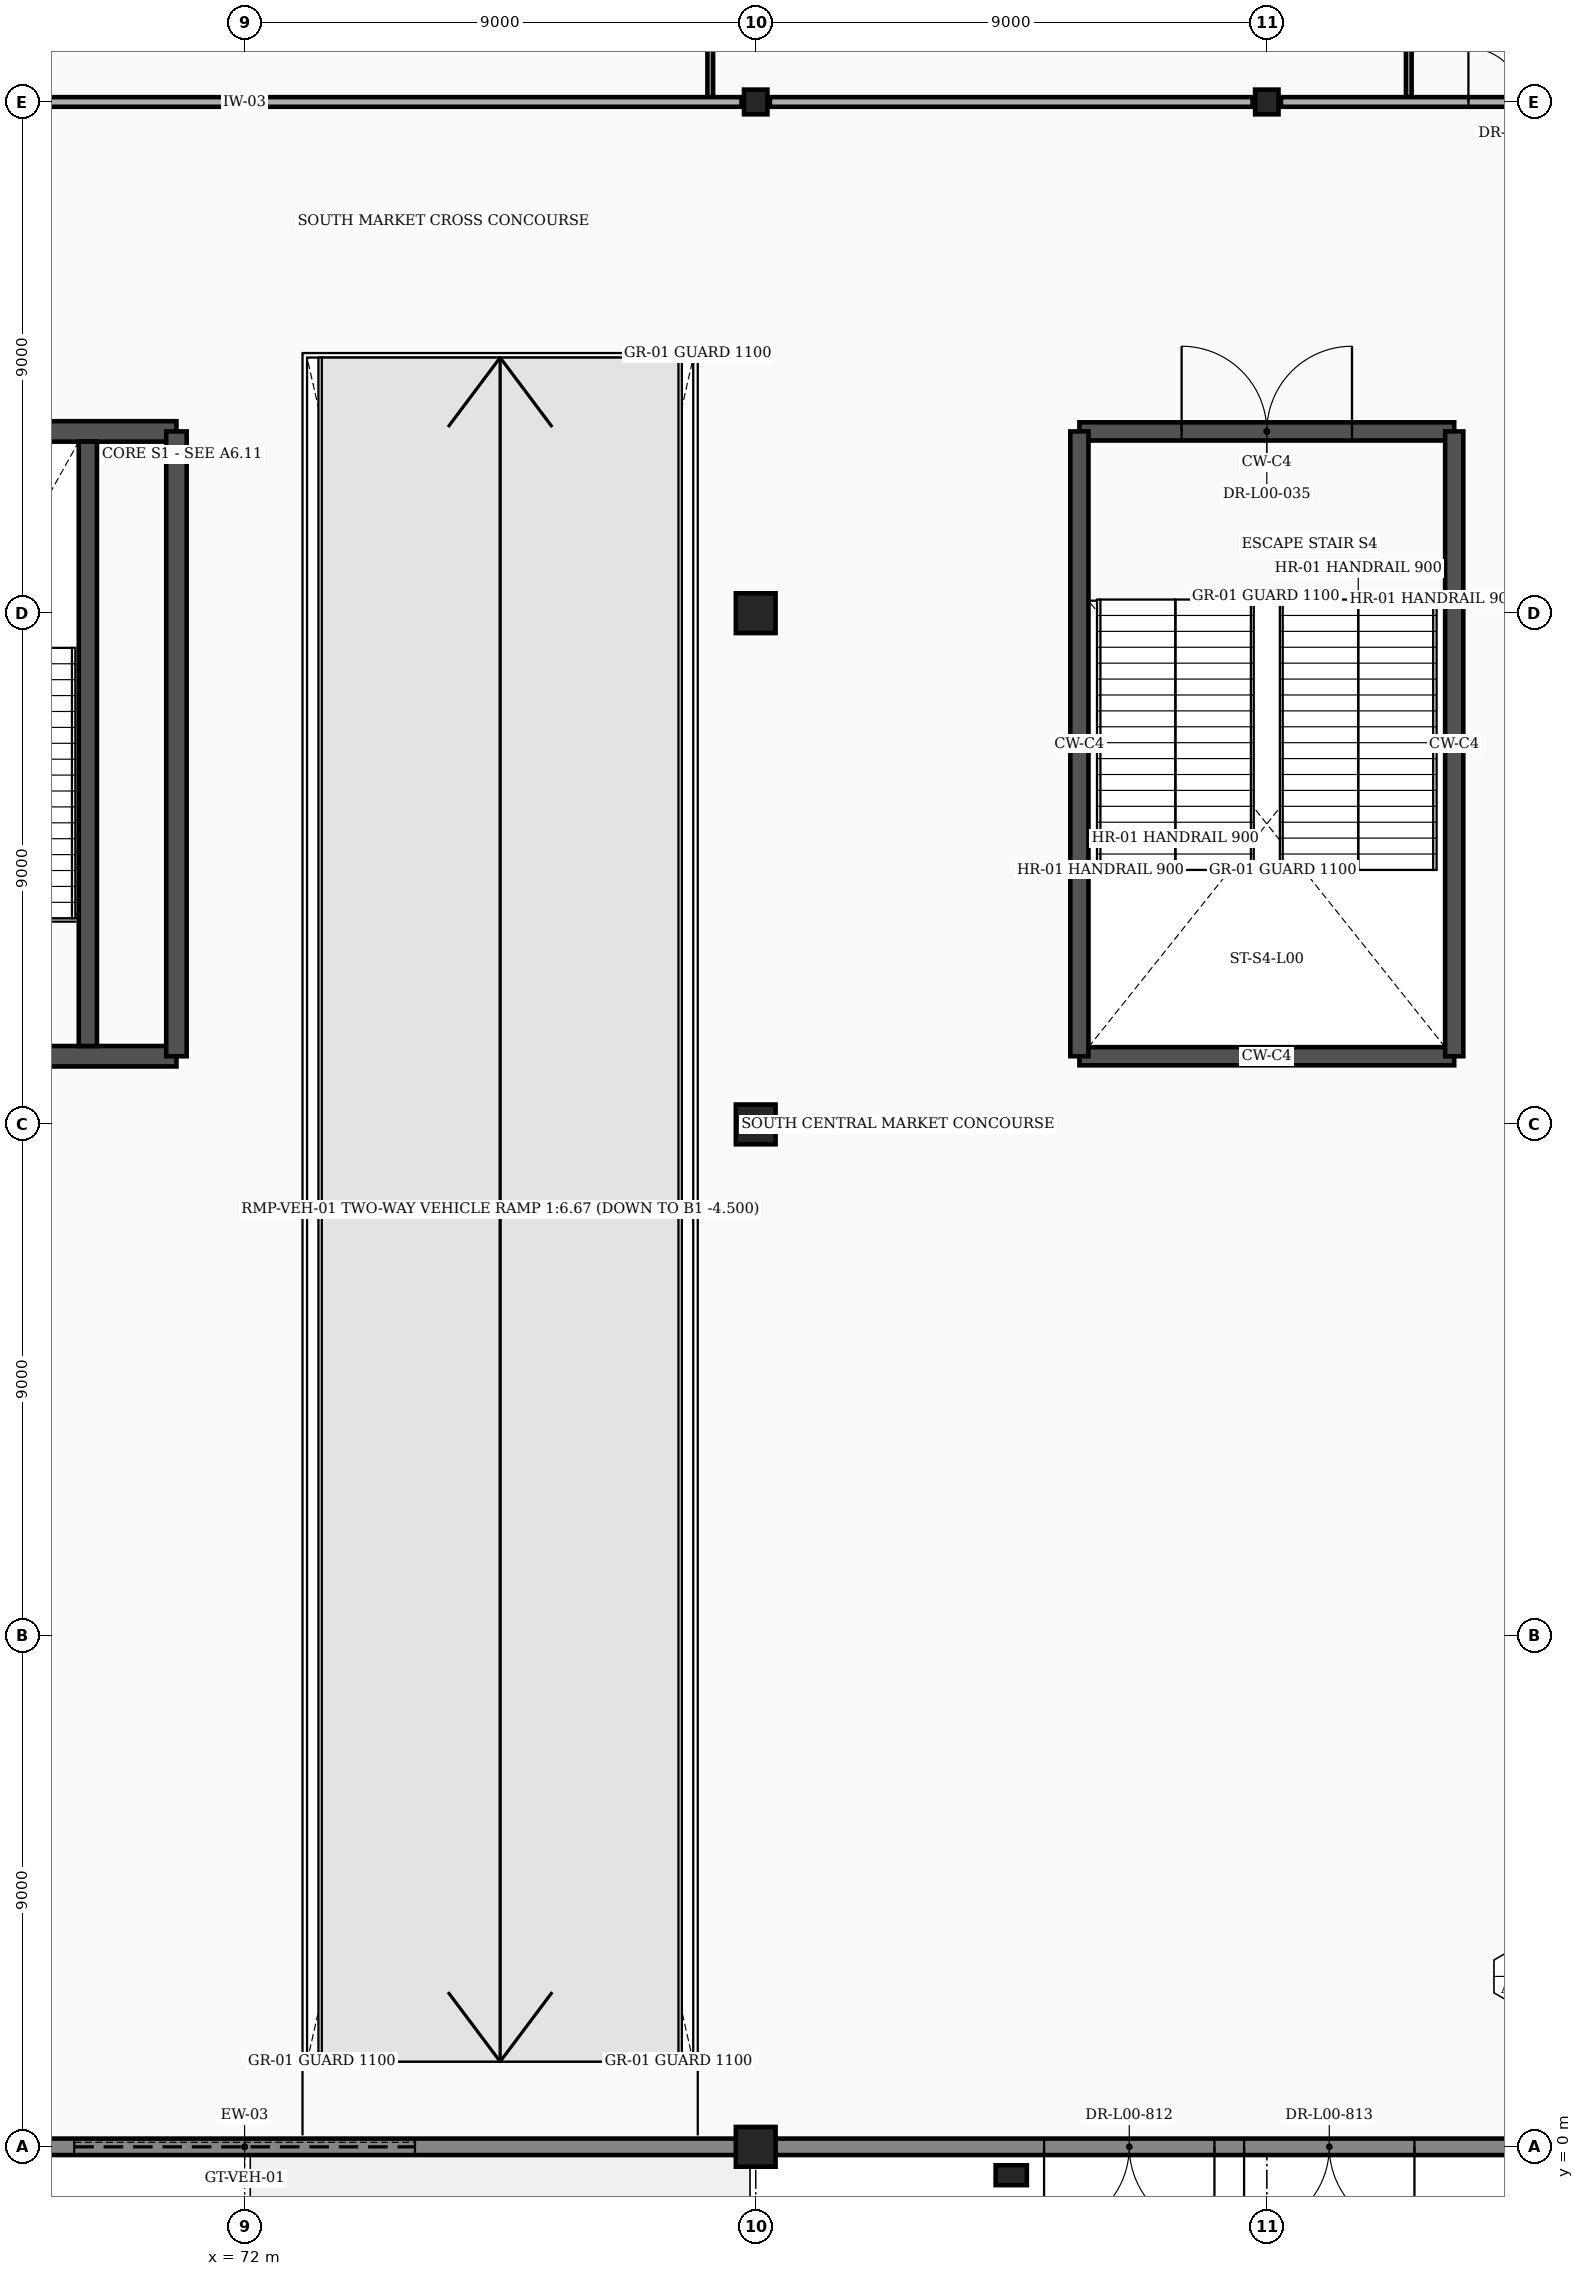
"""IFC4 building model, lengths in metres.
Left out: names, types, materials, properties, quantities, classifications, styles, units other than length and angle.
Written with IfcOpenShell. Run it as: python <this file> out.ifc"""

import sys

from ifc_helpers import new_model, si_unit, direction, frame, frame_2d, origin, origin_2d, place, context, subcontext, project, spatial, rectangle, i_section, extrude, element, fill, save


model = new_model("IFC4")
c1 = context("Model", 3, precision=1e-05, world=origin(), true_north=direction((0.0, 1.0)))
c2 = subcontext(c1, "Body", "Model", "MODEL_VIEW")
j1 = project(units=[si_unit("LENGTHUNIT", "METRE"), si_unit("PLANEANGLEUNIT", "RADIAN")], contexts=[c1])
p1 = place(None, origin())
s1 = spatial("IfcSite", under=j1, at=p1, CompositionType="ELEMENT")
p2 = place(p1, origin())
s2 = spatial("IfcBuilding", under=s1, at=p2, CompositionType="ELEMENT")
p3 = place(p2, origin())
s3 = spatial("IfcBuildingStorey", under=s2, at=p3, CompositionType="ELEMENT", Elevation=0.0)
for number, where, z_axis, x_axis in (
    (1, (81.0, 0.0, 0.0), (0.0, 0.0, 1.0), (1.0, 0.0, 0.0)),
    (2, (81.0, 18.0, 0.0), (0.0, 0.0, 1.0), (1.0, 0.0, 0.0)),
    (3, (81.0, 27.0, 0.0), (0.0, 0.0, 1.0), (1.0, 0.0, 0.0)),
):
    element("IfcColumn", number, at=place(p3, frame(where, z_axis=z_axis, x_axis=x_axis)), inside=s3, PredefinedType="COLUMN", context=c2, shape_type="SweptSolid", body=[
        extrude(rectangle(XDim=0.7, YDim=0.7, at=origin_2d()), origin(), (0.0, 0.0, 1.0), 6.0),
    ])
for number, where, z_axis, x_axis in (
    (4, (81.0, 36.0, 0.0), (0.0, 0.0, 1.0), (1.0, 0.0, 0.0)),
    (5, (90.0, 36.0, 0.0), (0.0, 0.0, 1.0), (1.0, 0.0, 0.0)),
):
    element("IfcColumn", number, at=place(p3, frame(where, z_axis=z_axis, x_axis=x_axis)), inside=s3, PredefinedType="COLUMN", context=c2, shape_type="SweptSolid", body=[
        extrude(i_section(OverallWidth=0.412, OverallDepth=0.435, WebThickness=0.036, FlangeThickness=0.058, at=origin_2d()), origin(), (0.0, 0.0, 1.0), 6.0),
    ])
p4 = place(p3, frame((85.5, -0.5, 0.0), z_axis=(0.0, 0.0, 1.0), x_axis=(1.0, 0.0, 0.0)))
e6 = element("IfcColumn", 6, at=p4, inside=s3, PredefinedType="PILASTER", context=c2, shape_type="SweptSolid", body=[
    extrude(rectangle(XDim=0.55, YDim=0.35, at=origin_2d()), origin(), (0.0, 0.0, 1.0), 6.0),
])
p5 = place(p3, frame((63.342, 0.0, 0.0), z_axis=(0.0, 0.0, 1.0), x_axis=(1.0, 0.0, 0.0)))
e7 = element("IfcWall", 7, at=p5, inside=s3, PredefinedType="STANDARD", context=c2, shape_type="SweptSolid", body=[
    extrude(rectangle(XDim=17.316, YDim=0.29, at=frame_2d((8.658, 0.0))), origin(), (0.0, 0.0, 1.0), 4.988),
])
p6 = place(p5, frame((5.658, 0.0, 0.0)))
e8 = element("IfcOpeningElement", 8, at=p6, cuts=e7, PredefinedType="OPENING", context=c2, shape_type="SweptSolid", body=[
    extrude(rectangle(XDim=6.0, YDim=3.6, at=frame_2d((3.0, 1.8))), frame((0.0, 0.157, 0.0), z_axis=(0.0, -1.0, 0.0), x_axis=(1.0, 0.0, 0.0)), (0.0, 0.0, 1.0), 0.314),
])
p7 = place(p3, frame((81.342, 0.0, 0.0), z_axis=(0.0, 0.0, 1.0), x_axis=(1.0, 0.0, 0.0)))
e9 = element("IfcWall", 9, at=p7, inside=s3, PredefinedType="STANDARD", context=c2, shape_type="SweptSolid", body=[
    extrude(rectangle(XDim=17.316, YDim=0.29, at=frame_2d((8.658, 0.0))), origin(), (0.0, 0.0, 1.0), 4.988),
])
p8 = place(p7, frame((4.736, 0.0, 0.0)))
e10 = element("IfcOpeningElement", 10, at=p8, cuts=e9, PredefinedType="OPENING", context=c2, shape_type="SweptSolid", body=[
    extrude(rectangle(XDim=3.0, YDim=2.4, at=frame_2d((1.5, 1.2))), frame((0.0, 0.157, 0.0), z_axis=(0.0, -1.0, 0.0), x_axis=(1.0, 0.0, 0.0)), (0.0, 0.0, 1.0), 0.314),
])
p9 = place(p7, frame((8.258, 0.0, 0.0)))
e11 = element("IfcOpeningElement", 11, at=p9, cuts=e9, PredefinedType="OPENING", context=c2, shape_type="SweptSolid", body=[
    extrude(rectangle(XDim=3.0, YDim=2.4, at=frame_2d((1.5, 1.2))), frame((0.0, 0.157, 0.0), z_axis=(0.0, -1.0, 0.0), x_axis=(1.0, 0.0, 0.0)), (0.0, 0.0, 1.0), 0.314),
])
p10 = place(p7, frame((12.93, 0.0, 0.0)))
e12 = element("IfcOpeningElement", 12, at=p10, cuts=e9, PredefinedType="OPENING", context=c2, shape_type="SweptSolid", body=[
    extrude(rectangle(XDim=3.0, YDim=2.4, at=frame_2d((1.5, 1.2))), frame((0.0, 0.157, 0.0), z_axis=(0.0, -1.0, 0.0), x_axis=(1.0, 0.0, 0.0)), (0.0, 0.0, 1.0), 0.314),
])
for number, where, z_axis, x_axis in (
    (13, (64.2, 19.2, 0.0), (0.0, 0.0, 1.0), (1.0, 0.0, 0.0)),
    (14, (64.2, 30.2, 0.0), (0.0, 0.0, 1.0), (1.0, 0.0, 0.0)),
):
    element("IfcWall", number, at=place(p3, frame(where, z_axis=z_axis, x_axis=x_axis)), inside=s3, PredefinedType="SHEAR", context=c2, shape_type="SweptSolid", body=[
        extrude(rectangle(XDim=6.6, YDim=0.36, at=frame_2d((3.3, 0.0))), origin(), (0.0, 0.0, 1.0), 5.75),
    ])
p11 = place(p3, frame((70.8, 19.2, 0.0), z_axis=(0.0, 0.0, 1.0), x_axis=(0.0, 1.0, 0.0)))
e15 = element("IfcWall", 15, at=p11, inside=s3, PredefinedType="SHEAR", context=c2, shape_type="SweptSolid", body=[
    extrude(rectangle(XDim=11.0, YDim=0.36, at=frame_2d((5.5, 0.0))), origin(), (0.0, 0.0, 1.0), 5.75),
])
p12 = place(p3, frame((69.24, 19.38, 0.0), z_axis=(0.0, 0.0, 1.0), x_axis=(0.0, 1.0, 0.0)))
e16 = element("IfcWall", 16, at=p12, inside=s3, PredefinedType="SHEAR", context=c2, shape_type="SweptSolid", body=[
    extrude(rectangle(XDim=10.64, YDim=0.32, at=frame_2d((5.32, 0.0))), origin(), (0.0, 0.0, 1.0), 5.75),
])
p13 = place(p3, frame((86.7, 19.2, 0.0), z_axis=(0.0, 0.0, 1.0), x_axis=(1.0, 0.0, 0.0)))
e17 = element("IfcWall", 17, at=p13, inside=s3, PredefinedType="SHEAR", context=c2, shape_type="SweptSolid", body=[
    extrude(rectangle(XDim=6.6, YDim=0.32, at=frame_2d((3.3, 0.0))), origin(), (0.0, 0.0, 1.0), 5.75),
])
p14 = place(p3, frame((86.7, 30.2, 0.0), z_axis=(0.0, 0.0, 1.0), x_axis=(1.0, 0.0, 0.0)))
e18 = element("IfcWall", 18, at=p14, inside=s3, PredefinedType="SHEAR", context=c2, shape_type="SweptSolid", body=[
    extrude(rectangle(XDim=6.6, YDim=0.32, at=frame_2d((3.3, 0.0))), origin(), (0.0, 0.0, 1.0), 5.75),
])
p15 = place(p14, frame((1.8, 0.0, 0.0)))
e19 = element("IfcOpeningElement", 19, at=p15, cuts=e18, PredefinedType="OPENING", context=c2, shape_type="SweptSolid", body=[
    extrude(rectangle(XDim=3.0, YDim=2.25, at=frame_2d((1.5, 1.125))), frame((0.0, 0.172, 0.0), z_axis=(0.0, -1.0, 0.0), x_axis=(1.0, 0.0, 0.0)), (0.0, 0.0, 1.0), 0.344),
])
for number, where, z_axis, x_axis in (
    (20, (86.7, 19.2, 0.0), (0.0, 0.0, 1.0), (0.0, 1.0, 0.0)),
    (21, (93.3, 19.2, 0.0), (0.0, 0.0, 1.0), (0.0, 1.0, 0.0)),
):
    element("IfcWall", number, at=place(p3, frame(where, z_axis=z_axis, x_axis=x_axis)), inside=s3, PredefinedType="SHEAR", context=c2, shape_type="SweptSolid", body=[
        extrude(rectangle(XDim=11.0, YDim=0.32, at=frame_2d((5.5, 0.0))), origin(), (0.0, 0.0, 1.0), 5.75),
    ])
p16 = place(p3, frame((80.2, 36.085, 0.0), z_axis=(0.0, 0.0, 1.0), x_axis=(0.0, 1.0, 0.0)))
e22 = element("IfcWall", 22, at=p16, inside=s3, PredefinedType="PARTITIONING", context=c2, shape_type="SweptSolid", body=[
    extrude(rectangle(XDim=9.865, YDim=0.1, at=frame_2d((4.933, 0.0))), origin(), (0.0, 0.0, 1.0), 4.2),
])
p17 = place(p3, frame((92.5, 36.085, 0.0), z_axis=(0.0, 0.0, 1.0), x_axis=(0.0, 1.0, 0.0)))
e23 = element("IfcWall", 23, at=p17, inside=s3, PredefinedType="PARTITIONING", context=c2, shape_type="SweptSolid", body=[
    extrude(rectangle(XDim=9.915, YDim=0.1, at=frame_2d((4.958, 0.0))), origin(), (0.0, 0.0, 1.0), 4.2),
])
p18 = place(p3, frame((63.25, 36.0, 0.0), z_axis=(0.0, 0.0, 1.0), x_axis=(1.0, 0.0, 0.0)))
e24 = element("IfcWall", 24, at=p18, inside=s3, PredefinedType="PARTITIONING", context=c2, shape_type="SweptSolid", body=[
    extrude(rectangle(XDim=17.5, YDim=0.17, at=frame_2d((8.75, 0.0))), origin(), (0.0, 0.0, 1.0), 4.988),
])
p19 = place(p3, frame((81.25, 36.0, 0.0), z_axis=(0.0, 0.0, 1.0), x_axis=(1.0, 0.0, 0.0)))
e25 = element("IfcWall", 25, at=p19, inside=s3, PredefinedType="PARTITIONING", context=c2, shape_type="SweptSolid", body=[
    extrude(rectangle(XDim=8.5, YDim=0.17, at=frame_2d((4.25, 0.0))), origin(), (0.0, 0.0, 1.0), 5.138),
])
p20 = place(p3, frame((90.25, 36.0, 0.0), z_axis=(0.0, 0.0, 1.0), x_axis=(1.0, 0.0, 0.0)))
e26 = element("IfcWall", 26, at=p20, inside=s3, PredefinedType="PARTITIONING", context=c2, shape_type="SweptSolid", body=[
    extrude(rectangle(XDim=8.5, YDim=0.17, at=frame_2d((4.25, 0.0))), origin(), (0.0, 0.0, 1.0), 5.138),
])
p21 = place(p20, frame((3.3, 0.0, 0.0)))
e27 = element("IfcOpeningElement", 27, at=p21, cuts=e26, PredefinedType="OPENING", context=c2, shape_type="SweptSolid", body=[
    extrude(rectangle(XDim=1.9, YDim=2.35, at=frame_2d((0.95, 1.175))), frame((0.0, 0.097, 0.0), z_axis=(0.0, -1.0, 0.0), x_axis=(1.0, 0.0, 0.0)), (0.0, 0.0, 1.0), 0.194),
])
p22 = place(p6, frame((6.0, 0.0, 0.0), z_axis=(0.0, 0.0, 1.0), x_axis=(-1.0, 0.0, 0.0)))
e28 = element("IfcDoor", 28, at=p22, inside=s3, OperationType="ROLLINGUP", PredefinedType="GATE", context=c2, shape_type="SweptSolid", body=[
    extrude(rectangle(XDim=6.0, YDim=3.6, at=frame_2d((3.0, 1.8))), frame((0.0, 0.025, 0.0), z_axis=(0.0, -1.0, 0.0), x_axis=(1.0, 0.0, 0.0)), (0.0, 0.0, 1.0), 0.05),
])
fill(e8, e28)
p23 = place(p8, frame((3.0, 0.0, 0.0), z_axis=(0.0, 0.0, 1.0), x_axis=(-1.0, 0.0, 0.0)))
e29 = element("IfcDoor", 29, at=p23, inside=s3, OperationType="DOUBLE_DOOR_SINGLE_SWING", PredefinedType="DOOR", context=c2, shape_type="SweptSolid", body=[
    extrude(rectangle(XDim=3.0, YDim=2.4, at=frame_2d((1.5, 1.2))), frame((0.0, 0.025, 0.0), z_axis=(0.0, -1.0, 0.0), x_axis=(1.0, 0.0, 0.0)), (0.0, 0.0, 1.0), 0.05),
])
fill(e10, e29)
p24 = place(p9, frame((3.0, 0.0, 0.0), z_axis=(0.0, 0.0, 1.0), x_axis=(-1.0, 0.0, 0.0)))
e30 = element("IfcDoor", 30, at=p24, inside=s3, OperationType="DOUBLE_DOOR_SINGLE_SWING", PredefinedType="DOOR", context=c2, shape_type="SweptSolid", body=[
    extrude(rectangle(XDim=3.0, YDim=2.4, at=frame_2d((1.5, 1.2))), frame((0.0, 0.025, 0.0), z_axis=(0.0, -1.0, 0.0), x_axis=(1.0, 0.0, 0.0)), (0.0, 0.0, 1.0), 0.05),
])
fill(e11, e30)
p25 = place(p15, origin())
e31 = element("IfcDoor", 31, at=p25, inside=s3, OperationType="DOUBLE_DOOR_SINGLE_SWING", PredefinedType="DOOR", context=c2, shape_type="SweptSolid", body=[
    extrude(rectangle(XDim=3.0, YDim=2.25, at=frame_2d((1.5, 1.125))), frame((0.0, 0.025, 0.0), z_axis=(0.0, -1.0, 0.0), x_axis=(1.0, 0.0, 0.0)), (0.0, 0.0, 1.0), 0.05),
])
fill(e19, e31)
p26 = place(p21, origin())
e32 = element("IfcDoor", 32, at=p26, inside=s3, OperationType="DOUBLE_DOOR_SINGLE_SWING", PredefinedType="DOOR", context=c2, shape_type="SweptSolid", body=[
    extrude(rectangle(XDim=1.9, YDim=2.35, at=frame_2d((0.95, 1.175))), frame((0.0, 0.025, 0.0), z_axis=(0.0, -1.0, 0.0), x_axis=(1.0, 0.0, 0.0)), (0.0, 0.0, 1.0), 0.05),
])
fill(e27, e32)
save(model, sys.argv[1])
